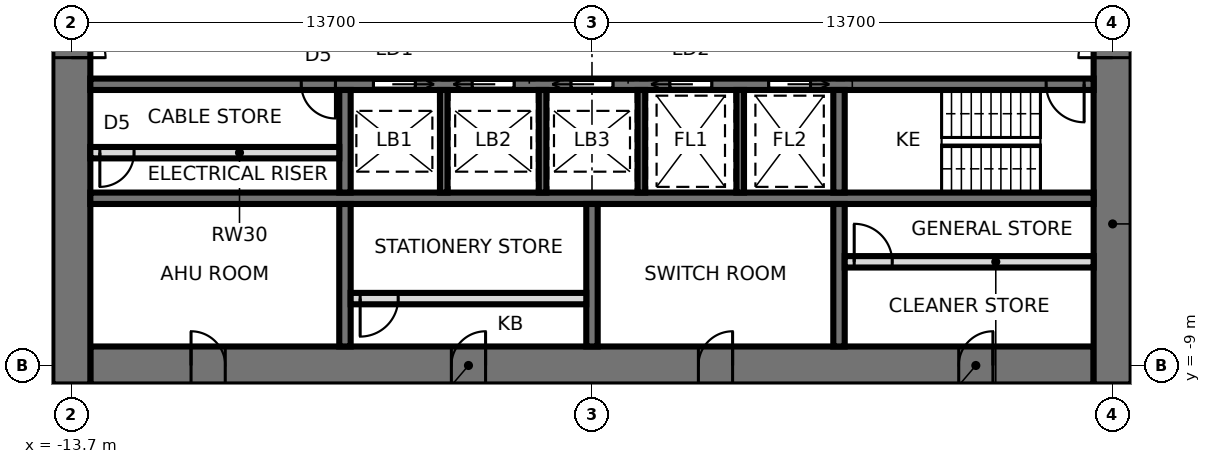
"""IFC4 building model, lengths in metres.
Left out: names, types, materials, properties, quantities, classifications, styles, units other than length and angle.
Written with IfcOpenShell. Run it as: python <this file> out.ifc"""

import sys

from ifc_helpers import new_model, si_unit, direction, frame, frame_2d, origin, place, context, subcontext, project, spatial, rectangle, extrude, element, fill, save


model = new_model("IFC4")
c1 = context("Model", 3, precision=1e-05, world=origin(), true_north=direction((0.0, 1.0)))
c2 = subcontext(c1, "Body", "Model", "MODEL_VIEW")
j1 = project(units=[si_unit("LENGTHUNIT", "METRE"), si_unit("PLANEANGLEUNIT", "RADIAN")], contexts=[c1])
p1 = place(None, origin())
s1 = spatial("IfcSite", under=j1, at=p1, CompositionType="ELEMENT")
p2 = place(p1, origin())
s2 = spatial("IfcBuilding", under=s1, at=p2, CompositionType="ELEMENT")
p3 = place(p2, frame((0.0, 0.0, 108.0)))
s3 = spatial("IfcBuildingStorey", under=s2, at=p3, CompositionType="ELEMENT", Elevation=108.0)
p4 = place(p3, frame((-13.2, -9.0, 0.0), z_axis=(0.0, 0.0, 1.0), x_axis=(1.0, 0.0, 0.0)))
e1 = element("IfcWall", 1, at=p4, inside=s3, PredefinedType="SHEAR", context=c2, shape_type="SweptSolid", body=[
    extrude(rectangle(XDim=26.4, YDim=1.0, at=frame_2d((13.2, 0.0))), origin(), (0.0, 0.0, 1.0), 3.9),
])
p5 = place(p4, frame((2.65, 0.0, 0.0)))
e2 = element("IfcOpeningElement", 2, at=p5, cuts=e1, PredefinedType="OPENING", context=c2, shape_type="SweptSolid", body=[
    extrude(rectangle(XDim=0.9, YDim=2.1, at=frame_2d((0.45, 1.05))), frame((0.0, 0.51, 0.0), z_axis=(0.0, -1.0, 0.0), x_axis=(1.0, 0.0, 0.0)), (0.0, 0.0, 1.0), 1.02),
])
p6 = place(p4, frame((9.5, 0.0, 0.0)))
e3 = element("IfcOpeningElement", 3, at=p6, cuts=e1, PredefinedType="OPENING", context=c2, shape_type="SweptSolid", body=[
    extrude(rectangle(XDim=0.9, YDim=2.1, at=frame_2d((0.45, 1.05))), frame((0.0, 0.51, 0.0), z_axis=(0.0, -1.0, 0.0), x_axis=(1.0, 0.0, 0.0)), (0.0, 0.0, 1.0), 1.02),
])
p7 = place(p4, frame((16.0, 0.0, 0.0)))
e4 = element("IfcOpeningElement", 4, at=p7, cuts=e1, PredefinedType="OPENING", context=c2, shape_type="SweptSolid", body=[
    extrude(rectangle(XDim=0.9, YDim=2.1, at=frame_2d((0.45, 1.05))), frame((0.0, 0.51, 0.0), z_axis=(0.0, -1.0, 0.0), x_axis=(1.0, 0.0, 0.0)), (0.0, 0.0, 1.0), 1.02),
])
p8 = place(p4, frame((22.85, 0.0, 0.0)))
e5 = element("IfcOpeningElement", 5, at=p8, cuts=e1, PredefinedType="OPENING", context=c2, shape_type="SweptSolid", body=[
    extrude(rectangle(XDim=0.9, YDim=2.1, at=frame_2d((0.45, 1.05))), frame((0.0, 0.51, 0.0), z_axis=(0.0, -1.0, 0.0), x_axis=(1.0, 0.0, 0.0)), (0.0, 0.0, 1.0), 1.02),
])
p9 = place(p3, frame((13.7, -9.5, 0.0), z_axis=(0.0, 0.0, 1.0), x_axis=(0.0, 1.0, 0.0)))
e6 = element("IfcWall", 6, at=p9, inside=s3, PredefinedType="SHEAR", context=c2, shape_type="SweptSolid", body=[
    extrude(rectangle(XDim=19.0, YDim=1.0, at=frame_2d((9.5, 0.0))), origin(), (0.0, 0.0, 1.0), 3.9),
])
p10 = place(p9, frame((8.6, 0.0, 0.0)))
e7 = element("IfcOpeningElement", 7, at=p10, cuts=e6, PredefinedType="OPENING", context=c2, shape_type="SweptSolid", body=[
    extrude(rectangle(XDim=1.8, YDim=2.4, at=frame_2d((0.9, 1.2))), frame((0.0, 0.51, 0.0), z_axis=(0.0, -1.0, 0.0), x_axis=(1.0, 0.0, 0.0)), (0.0, 0.0, 1.0), 1.02),
])
p11 = place(p3, frame((-13.7, 9.5, 0.0), z_axis=(0.0, 0.0, 1.0), x_axis=(0.0, -1.0, 0.0)))
e8 = element("IfcWall", 8, at=p11, inside=s3, PredefinedType="SHEAR", context=c2, shape_type="SweptSolid", body=[
    extrude(rectangle(XDim=19.0, YDim=1.0, at=frame_2d((9.5, 0.0))), origin(), (0.0, 0.0, 1.0), 3.9),
])
p12 = place(p11, frame((8.6, 0.0, 0.0)))
e9 = element("IfcOpeningElement", 9, at=p12, cuts=e8, PredefinedType="OPENING", context=c2, shape_type="SweptSolid", body=[
    extrude(rectangle(XDim=1.8, YDim=2.4, at=frame_2d((0.9, 1.2))), frame((0.0, 0.51, 0.0), z_axis=(0.0, -1.0, 0.0), x_axis=(1.0, 0.0, 0.0)), (0.0, 0.0, 1.0), 1.02),
])
p13 = place(p3, frame((-13.2, -1.6, 0.0), z_axis=(0.0, 0.0, 1.0), x_axis=(1.0, 0.0, 0.0)))
e10 = element("IfcWall", 10, at=p13, inside=s3, PredefinedType="SHEAR", context=c2, shape_type="SweptSolid", body=[
    extrude(rectangle(XDim=26.4, YDim=0.3, at=frame_2d((13.2, 0.0))), origin(), (0.0, 0.0, 1.0), 3.9),
])
p14 = place(p13, frame((25.15, 0.0, 0.0)))
e11 = element("IfcOpeningElement", 11, at=p14, cuts=e10, PredefinedType="OPENING", context=c2, shape_type="SweptSolid", body=[
    extrude(rectangle(XDim=1.0, YDim=2.1, at=frame_2d((0.5, 1.05))), frame((0.0, 0.16, 0.0), z_axis=(0.0, -1.0, 0.0), x_axis=(1.0, 0.0, 0.0)), (0.0, 0.0, 1.0), 0.32),
])
p15 = place(p13, frame((7.45, 0.0, 0.0)))
e12 = element("IfcOpeningElement", 12, at=p15, cuts=e10, PredefinedType="OPENING", context=c2, shape_type="SweptSolid", body=[
    extrude(rectangle(XDim=1.1, YDim=2.3, at=frame_2d((0.55, 1.15))), frame((0.0, 0.16, 0.0), z_axis=(0.0, -1.0, 0.0), x_axis=(1.0, 0.0, 0.0)), (0.0, 0.0, 1.0), 0.32),
])
p16 = place(p13, frame((10.05, 0.0, 0.0)))
e13 = element("IfcOpeningElement", 13, at=p16, cuts=e10, PredefinedType="OPENING", context=c2, shape_type="SweptSolid", body=[
    extrude(rectangle(XDim=1.1, YDim=2.3, at=frame_2d((0.55, 1.15))), frame((0.0, 0.16, 0.0), z_axis=(0.0, -1.0, 0.0), x_axis=(1.0, 0.0, 0.0)), (0.0, 0.0, 1.0), 0.32),
])
p17 = place(p13, frame((12.65, 0.0, 0.0)))
e14 = element("IfcOpeningElement", 14, at=p17, cuts=e10, PredefinedType="OPENING", context=c2, shape_type="SweptSolid", body=[
    extrude(rectangle(XDim=1.1, YDim=2.3, at=frame_2d((0.55, 1.15))), frame((0.0, 0.16, 0.0), z_axis=(0.0, -1.0, 0.0), x_axis=(1.0, 0.0, 0.0)), (0.0, 0.0, 1.0), 0.32),
])
p18 = place(p13, frame((15.25, 0.0, 0.0)))
e15 = element("IfcOpeningElement", 15, at=p18, cuts=e10, PredefinedType="OPENING", context=c2, shape_type="SweptSolid", body=[
    extrude(rectangle(XDim=1.1, YDim=2.3, at=frame_2d((0.55, 1.15))), frame((0.0, 0.16, 0.0), z_axis=(0.0, -1.0, 0.0), x_axis=(1.0, 0.0, 0.0)), (0.0, 0.0, 1.0), 0.32),
])
p19 = place(p13, frame((17.85, 0.0, 0.0)))
e16 = element("IfcOpeningElement", 16, at=p19, cuts=e10, PredefinedType="OPENING", context=c2, shape_type="SweptSolid", body=[
    extrude(rectangle(XDim=1.1, YDim=2.3, at=frame_2d((0.55, 1.15))), frame((0.0, 0.16, 0.0), z_axis=(0.0, -1.0, 0.0), x_axis=(1.0, 0.0, 0.0)), (0.0, 0.0, 1.0), 0.32),
])
p20 = place(p13, frame((5.55, 0.0, 0.0)))
e17 = element("IfcOpeningElement", 17, at=p20, cuts=e10, PredefinedType="OPENING", context=c2, shape_type="SweptSolid", body=[
    extrude(rectangle(XDim=0.9, YDim=2.1, at=frame_2d((0.45, 1.05))), frame((0.0, 0.16, 0.0), z_axis=(0.0, -1.0, 0.0), x_axis=(1.0, 0.0, 0.0)), (0.0, 0.0, 1.0), 0.32),
])
p21 = place(p3, frame((-13.2, -4.6, 0.0), z_axis=(0.0, 0.0, 1.0), x_axis=(1.0, 0.0, 0.0)))
e18 = element("IfcWall", 18, at=p21, inside=s3, PredefinedType="SHEAR", context=c2, shape_type="SweptSolid", body=[
    extrude(rectangle(XDim=26.4, YDim=0.3, at=frame_2d((13.2, 0.0))), origin(), (0.0, 0.0, 1.0), 3.9),
])
p22 = place(p3, frame((-6.5, -1.75, 0.0), z_axis=(0.0, 0.0, 1.0), x_axis=(0.0, -1.0, 0.0)))
e19 = element("IfcWall", 19, at=p22, inside=s3, PredefinedType="SHEAR", context=c2, shape_type="SweptSolid", body=[
    extrude(rectangle(XDim=2.7, YDim=0.3, at=frame_2d((1.35, 0.0))), origin(), (0.0, 0.0, 1.0), 3.9),
])
p23 = place(p3, frame((-6.5, -4.75, 0.0), z_axis=(0.0, 0.0, 1.0), x_axis=(0.0, -1.0, 0.0)))
e20 = element("IfcWall", 20, at=p23, inside=s3, PredefinedType="SHEAR", context=c2, shape_type="SweptSolid", body=[
    extrude(rectangle(XDim=3.75, YDim=0.3, at=frame_2d((1.875, 0.0))), origin(), (0.0, 0.0, 1.0), 3.9),
])
p24 = place(p3, frame((6.5, -1.75, 0.0), z_axis=(0.0, 0.0, 1.0), x_axis=(0.0, -1.0, 0.0)))
e21 = element("IfcWall", 21, at=p24, inside=s3, PredefinedType="SHEAR", context=c2, shape_type="SweptSolid", body=[
    extrude(rectangle(XDim=2.7, YDim=0.3, at=frame_2d((1.35, 0.0))), origin(), (0.0, 0.0, 1.0), 3.9),
])
p25 = place(p3, frame((6.5, -4.75, 0.0), z_axis=(0.0, 0.0, 1.0), x_axis=(0.0, -1.0, 0.0)))
e22 = element("IfcWall", 22, at=p25, inside=s3, PredefinedType="SHEAR", context=c2, shape_type="SweptSolid", body=[
    extrude(rectangle(XDim=3.75, YDim=0.3, at=frame_2d((1.875, 0.0))), origin(), (0.0, 0.0, 1.0), 3.9),
])
for number, where, z_axis, x_axis in (
    (23, (-3.9, -1.75, 0.0), (0.0, 0.0, 1.0), (0.0, -1.0, 0.0)),
    (24, (-1.3, -1.75, 0.0), (0.0, 0.0, 1.0), (0.0, -1.0, 0.0)),
    (25, (1.3, -1.75, 0.0), (0.0, 0.0, 1.0), (0.0, -1.0, 0.0)),
    (26, (3.9, -1.75, 0.0), (0.0, 0.0, 1.0), (0.0, -1.0, 0.0)),
):
    element("IfcWall", number, at=place(p3, frame(where, z_axis=z_axis, x_axis=x_axis)), inside=s3, PredefinedType="SHEAR", context=c2, shape_type="SweptSolid", body=[
        extrude(rectangle(XDim=2.7, YDim=0.2, at=frame_2d((1.35, 0.0))), origin(), (0.0, 0.0, 1.0), 3.9),
    ])
p26 = place(p3, frame((0.0, -4.75, 0.0), z_axis=(0.0, 0.0, 1.0), x_axis=(0.0, -1.0, 0.0)))
e27 = element("IfcWall", 27, at=p26, inside=s3, PredefinedType="SHEAR", context=c2, shape_type="SweptSolid", body=[
    extrude(rectangle(XDim=3.75, YDim=0.3, at=frame_2d((1.875, 0.0))), origin(), (0.0, 0.0, 1.0), 3.9),
])
p27 = place(p3, frame((-6.35, -7.24, 0.0), z_axis=(0.0, 0.0, 1.0), x_axis=(1.0, 0.0, 0.0)))
e28 = element("IfcWall", 28, at=p27, inside=s3, PredefinedType="PARTITIONING", context=c2, shape_type="SweptSolid", body=[
    extrude(rectangle(XDim=6.2, YDim=0.3, at=frame_2d((3.1, 0.0))), origin(), (0.0, 0.0, 1.0), 3.74),
])
p28 = place(p27, frame((0.25, 0.0, 0.0)))
e29 = element("IfcOpeningElement", 29, at=p28, cuts=e28, PredefinedType="OPENING", context=c2, shape_type="SweptSolid", body=[
    extrude(rectangle(XDim=1.0, YDim=2.4, at=frame_2d((0.5, 1.2))), frame((0.0, 0.16, 0.0), z_axis=(0.0, -1.0, 0.0), x_axis=(1.0, 0.0, 0.0)), (0.0, 0.0, 1.0), 0.32),
])
p29 = place(p3, frame((6.65, -6.272, 0.0), z_axis=(0.0, 0.0, 1.0), x_axis=(1.0, 0.0, 0.0)))
e30 = element("IfcWall", 30, at=p29, inside=s3, PredefinedType="PARTITIONING", context=c2, shape_type="SweptSolid", body=[
    extrude(rectangle(XDim=6.55, YDim=0.3, at=frame_2d((3.275, 0.0))), origin(), (0.0, 0.0, 1.0), 3.74),
])
p30 = place(p29, frame((0.25, 0.0, 0.0)))
e31 = element("IfcOpeningElement", 31, at=p30, cuts=e30, PredefinedType="OPENING", context=c2, shape_type="SweptSolid", body=[
    extrude(rectangle(XDim=1.0, YDim=2.4, at=frame_2d((0.5, 1.2))), frame((0.0, 0.16, 0.0), z_axis=(0.0, -1.0, 0.0), x_axis=(1.0, 0.0, 0.0)), (0.0, 0.0, 1.0), 0.32),
])
p31 = place(p3, frame((-13.2, -3.4, 0.0), z_axis=(0.0, 0.0, 1.0), x_axis=(1.0, 0.0, 0.0)))
e32 = element("IfcWall", 32, at=p31, inside=s3, PredefinedType="SOLIDWALL", context=c2, shape_type="SweptSolid", body=[
    extrude(rectangle(XDim=6.55, YDim=0.3, at=frame_2d((3.275, 0.0))), origin(), (0.0, 0.0, 1.0), 3.74),
])
p32 = place(p31, frame((0.25, 0.0, 0.0)))
e33 = element("IfcOpeningElement", 33, at=p32, cuts=e32, PredefinedType="OPENING", context=c2, shape_type="SweptSolid", body=[
    extrude(rectangle(XDim=0.9, YDim=2.1, at=frame_2d((0.45, 1.05))), frame((0.0, 0.16, 0.0), z_axis=(0.0, -1.0, 0.0), x_axis=(1.0, 0.0, 0.0)), (0.0, 0.0, 1.0), 0.32),
])
p33 = place(p12, origin())
e34 = element("IfcDoor", 34, at=p33, inside=s3, OperationType="DOUBLE_DOOR_SINGLE_SWING", PredefinedType="DOOR", context=c2, shape_type="SweptSolid", body=[
    extrude(rectangle(XDim=1.72, YDim=2.36, at=frame_2d((0.9, 1.18))), frame((0.0, 0.025, 0.0), z_axis=(0.0, -1.0, 0.0), x_axis=(1.0, 0.0, 0.0)), (0.0, 0.0, 1.0), 0.05),
    extrude(rectangle(XDim=0.04, YDim=2.4, at=frame_2d((0.02, 1.2))), frame((0.0, 0.25, 0.0), z_axis=(0.0, -1.0, 0.0), x_axis=(1.0, 0.0, 0.0)), (0.0, 0.0, 1.0), 0.5),
    extrude(rectangle(XDim=0.04, YDim=2.4, at=frame_2d((1.78, 1.2))), frame((0.0, 0.25, 0.0), z_axis=(0.0, -1.0, 0.0), x_axis=(1.0, 0.0, 0.0)), (0.0, 0.0, 1.0), 0.5),
    extrude(rectangle(XDim=1.72, YDim=0.04, at=frame_2d((0.9, 2.38))), frame((0.0, 0.25, 0.0), z_axis=(0.0, -1.0, 0.0), x_axis=(1.0, 0.0, 0.0)), (0.0, 0.0, 1.0), 0.5),
])
fill(e9, e34)
p34 = place(p10, origin())
e35 = element("IfcDoor", 35, at=p34, inside=s3, OperationType="DOUBLE_DOOR_SINGLE_SWING", PredefinedType="DOOR", context=c2, shape_type="SweptSolid", body=[
    extrude(rectangle(XDim=1.72, YDim=2.36, at=frame_2d((0.9, 1.18))), frame((0.0, 0.025, 0.0), z_axis=(0.0, -1.0, 0.0), x_axis=(1.0, 0.0, 0.0)), (0.0, 0.0, 1.0), 0.05),
    extrude(rectangle(XDim=0.04, YDim=2.4, at=frame_2d((0.02, 1.2))), frame((0.0, 0.25, 0.0), z_axis=(0.0, -1.0, 0.0), x_axis=(1.0, 0.0, 0.0)), (0.0, 0.0, 1.0), 0.5),
    extrude(rectangle(XDim=0.04, YDim=2.4, at=frame_2d((1.78, 1.2))), frame((0.0, 0.25, 0.0), z_axis=(0.0, -1.0, 0.0), x_axis=(1.0, 0.0, 0.0)), (0.0, 0.0, 1.0), 0.5),
    extrude(rectangle(XDim=1.72, YDim=0.04, at=frame_2d((0.9, 2.38))), frame((0.0, 0.25, 0.0), z_axis=(0.0, -1.0, 0.0), x_axis=(1.0, 0.0, 0.0)), (0.0, 0.0, 1.0), 0.5),
])
fill(e7, e35)
p35 = place(p14, frame((1.0, 0.0, 0.0), z_axis=(0.0, 0.0, 1.0), x_axis=(-1.0, 0.0, 0.0)))
e36 = element("IfcDoor", 36, at=p35, inside=s3, OperationType="SINGLE_SWING_LEFT", PredefinedType="DOOR", context=c2, shape_type="SweptSolid", body=[
    extrude(rectangle(XDim=1.0, YDim=2.1, at=frame_2d((0.5, 1.05))), frame((0.0, 0.025, 0.0), z_axis=(0.0, -1.0, 0.0), x_axis=(1.0, 0.0, 0.0)), (0.0, 0.0, 1.0), 0.05),
])
fill(e11, e36)
p36 = place(p15, frame((1.1, 0.0, 0.0), z_axis=(0.0, 0.0, 1.0), x_axis=(-1.0, 0.0, 0.0)))
e37 = element("IfcDoor", 37, at=p36, inside=s3, OperationType="SLIDING_TO_LEFT", PredefinedType="DOOR", context=c2, shape_type="SweptSolid", body=[
    extrude(rectangle(XDim=1.1, YDim=2.3, at=frame_2d((0.55, 1.15))), frame((0.0, 0.025, 0.0), z_axis=(0.0, -1.0, 0.0), x_axis=(1.0, 0.0, 0.0)), (0.0, 0.0, 1.0), 0.05),
])
fill(e12, e37)
p37 = place(p16, frame((1.1, 0.0, 0.0), z_axis=(0.0, 0.0, 1.0), x_axis=(-1.0, 0.0, 0.0)))
e38 = element("IfcDoor", 38, at=p37, inside=s3, OperationType="SLIDING_TO_RIGHT", PredefinedType="DOOR", context=c2, shape_type="SweptSolid", body=[
    extrude(rectangle(XDim=1.1, YDim=2.3, at=frame_2d((0.55, 1.15))), frame((0.0, 0.025, 0.0), z_axis=(0.0, -1.0, 0.0), x_axis=(1.0, 0.0, 0.0)), (0.0, 0.0, 1.0), 0.05),
])
fill(e13, e38)
p38 = place(p17, frame((1.1, 0.0, 0.0), z_axis=(0.0, 0.0, 1.0), x_axis=(-1.0, 0.0, 0.0)))
e39 = element("IfcDoor", 39, at=p38, inside=s3, OperationType="SLIDING_TO_RIGHT", PredefinedType="DOOR", context=c2, shape_type="SweptSolid", body=[
    extrude(rectangle(XDim=1.1, YDim=2.3, at=frame_2d((0.55, 1.15))), frame((0.0, 0.025, 0.0), z_axis=(0.0, -1.0, 0.0), x_axis=(1.0, 0.0, 0.0)), (0.0, 0.0, 1.0), 0.05),
])
fill(e14, e39)
p39 = place(p18, frame((1.1, 0.0, 0.0), z_axis=(0.0, 0.0, 1.0), x_axis=(-1.0, 0.0, 0.0)))
e40 = element("IfcDoor", 40, at=p39, inside=s3, OperationType="SLIDING_TO_RIGHT", PredefinedType="DOOR", context=c2, shape_type="SweptSolid", body=[
    extrude(rectangle(XDim=1.1, YDim=2.3, at=frame_2d((0.55, 1.15))), frame((0.0, 0.025, 0.0), z_axis=(0.0, -1.0, 0.0), x_axis=(1.0, 0.0, 0.0)), (0.0, 0.0, 1.0), 0.05),
])
fill(e15, e40)
p40 = place(p19, frame((1.1, 0.0, 0.0), z_axis=(0.0, 0.0, 1.0), x_axis=(-1.0, 0.0, 0.0)))
e41 = element("IfcDoor", 41, at=p40, inside=s3, OperationType="SLIDING_TO_LEFT", PredefinedType="DOOR", context=c2, shape_type="SweptSolid", body=[
    extrude(rectangle(XDim=1.1, YDim=2.3, at=frame_2d((0.55, 1.15))), frame((0.0, 0.025, 0.0), z_axis=(0.0, -1.0, 0.0), x_axis=(1.0, 0.0, 0.0)), (0.0, 0.0, 1.0), 0.05),
])
fill(e16, e41)
p41 = place(p20, frame((0.9, 0.0, 0.0), z_axis=(0.0, 0.0, 1.0), x_axis=(-1.0, 0.0, 0.0)))
e42 = element("IfcDoor", 42, at=p41, inside=s3, OperationType="SINGLE_SWING_LEFT", PredefinedType="DOOR", context=c2, shape_type="SweptSolid", body=[
    extrude(rectangle(XDim=0.9, YDim=2.1, at=frame_2d((0.45, 1.05))), frame((0.0, 0.025, 0.0), z_axis=(0.0, -1.0, 0.0), x_axis=(1.0, 0.0, 0.0)), (0.0, 0.0, 1.0), 0.05),
])
fill(e17, e42)
p42 = place(p5, origin())
e43 = element("IfcDoor", 43, at=p42, inside=s3, OperationType="SINGLE_SWING_LEFT", PredefinedType="DOOR", context=c2, shape_type="SweptSolid", body=[
    extrude(rectangle(XDim=0.82, YDim=2.06, at=frame_2d((0.45, 1.03))), frame((0.0, 0.025, 0.0), z_axis=(0.0, -1.0, 0.0), x_axis=(1.0, 0.0, 0.0)), (0.0, 0.0, 1.0), 0.05),
    extrude(rectangle(XDim=0.04, YDim=2.1, at=frame_2d((0.02, 1.05))), frame((0.0, 0.25, 0.0), z_axis=(0.0, -1.0, 0.0), x_axis=(1.0, 0.0, 0.0)), (0.0, 0.0, 1.0), 0.5),
    extrude(rectangle(XDim=0.04, YDim=2.1, at=frame_2d((0.88, 1.05))), frame((0.0, 0.25, 0.0), z_axis=(0.0, -1.0, 0.0), x_axis=(1.0, 0.0, 0.0)), (0.0, 0.0, 1.0), 0.5),
    extrude(rectangle(XDim=0.82, YDim=0.04, at=frame_2d((0.45, 2.08))), frame((0.0, 0.25, 0.0), z_axis=(0.0, -1.0, 0.0), x_axis=(1.0, 0.0, 0.0)), (0.0, 0.0, 1.0), 0.5),
])
fill(e2, e43)
p43 = place(p6, origin())
e44 = element("IfcDoor", 44, at=p43, inside=s3, OperationType="SINGLE_SWING_RIGHT", PredefinedType="DOOR", context=c2, shape_type="SweptSolid", body=[
    extrude(rectangle(XDim=0.82, YDim=2.06, at=frame_2d((0.45, 1.03))), frame((0.0, 0.025, 0.0), z_axis=(0.0, -1.0, 0.0), x_axis=(1.0, 0.0, 0.0)), (0.0, 0.0, 1.0), 0.05),
    extrude(rectangle(XDim=0.04, YDim=2.1, at=frame_2d((0.02, 1.05))), frame((0.0, 0.25, 0.0), z_axis=(0.0, -1.0, 0.0), x_axis=(1.0, 0.0, 0.0)), (0.0, 0.0, 1.0), 0.5),
    extrude(rectangle(XDim=0.04, YDim=2.1, at=frame_2d((0.88, 1.05))), frame((0.0, 0.25, 0.0), z_axis=(0.0, -1.0, 0.0), x_axis=(1.0, 0.0, 0.0)), (0.0, 0.0, 1.0), 0.5),
    extrude(rectangle(XDim=0.82, YDim=0.04, at=frame_2d((0.45, 2.08))), frame((0.0, 0.25, 0.0), z_axis=(0.0, -1.0, 0.0), x_axis=(1.0, 0.0, 0.0)), (0.0, 0.0, 1.0), 0.5),
])
fill(e3, e44)
p44 = place(p7, origin())
e45 = element("IfcDoor", 45, at=p44, inside=s3, OperationType="SINGLE_SWING_RIGHT", PredefinedType="DOOR", context=c2, shape_type="SweptSolid", body=[
    extrude(rectangle(XDim=0.82, YDim=2.06, at=frame_2d((0.45, 1.03))), frame((0.0, 0.025, 0.0), z_axis=(0.0, -1.0, 0.0), x_axis=(1.0, 0.0, 0.0)), (0.0, 0.0, 1.0), 0.05),
    extrude(rectangle(XDim=0.04, YDim=2.1, at=frame_2d((0.02, 1.05))), frame((0.0, 0.25, 0.0), z_axis=(0.0, -1.0, 0.0), x_axis=(1.0, 0.0, 0.0)), (0.0, 0.0, 1.0), 0.5),
    extrude(rectangle(XDim=0.04, YDim=2.1, at=frame_2d((0.88, 1.05))), frame((0.0, 0.25, 0.0), z_axis=(0.0, -1.0, 0.0), x_axis=(1.0, 0.0, 0.0)), (0.0, 0.0, 1.0), 0.5),
    extrude(rectangle(XDim=0.82, YDim=0.04, at=frame_2d((0.45, 2.08))), frame((0.0, 0.25, 0.0), z_axis=(0.0, -1.0, 0.0), x_axis=(1.0, 0.0, 0.0)), (0.0, 0.0, 1.0), 0.5),
])
fill(e4, e45)
p45 = place(p8, origin())
e46 = element("IfcDoor", 46, at=p45, inside=s3, OperationType="SINGLE_SWING_RIGHT", PredefinedType="DOOR", context=c2, shape_type="SweptSolid", body=[
    extrude(rectangle(XDim=0.82, YDim=2.06, at=frame_2d((0.45, 1.03))), frame((0.0, 0.025, 0.0), z_axis=(0.0, -1.0, 0.0), x_axis=(1.0, 0.0, 0.0)), (0.0, 0.0, 1.0), 0.05),
    extrude(rectangle(XDim=0.04, YDim=2.1, at=frame_2d((0.02, 1.05))), frame((0.0, 0.25, 0.0), z_axis=(0.0, -1.0, 0.0), x_axis=(1.0, 0.0, 0.0)), (0.0, 0.0, 1.0), 0.5),
    extrude(rectangle(XDim=0.04, YDim=2.1, at=frame_2d((0.88, 1.05))), frame((0.0, 0.25, 0.0), z_axis=(0.0, -1.0, 0.0), x_axis=(1.0, 0.0, 0.0)), (0.0, 0.0, 1.0), 0.5),
    extrude(rectangle(XDim=0.82, YDim=0.04, at=frame_2d((0.45, 2.08))), frame((0.0, 0.25, 0.0), z_axis=(0.0, -1.0, 0.0), x_axis=(1.0, 0.0, 0.0)), (0.0, 0.0, 1.0), 0.5),
])
fill(e5, e46)
p46 = place(p28, frame((1.0, 0.0, 0.0), z_axis=(0.0, 0.0, 1.0), x_axis=(-1.0, 0.0, 0.0)))
e47 = element("IfcDoor", 47, at=p46, inside=s3, OperationType="SINGLE_SWING_RIGHT", PredefinedType="DOOR", context=c2, shape_type="SweptSolid", body=[
    extrude(rectangle(XDim=1.0, YDim=2.4, at=frame_2d((0.5, 1.2))), frame((0.0, 0.025, 0.0), z_axis=(0.0, -1.0, 0.0), x_axis=(1.0, 0.0, 0.0)), (0.0, 0.0, 1.0), 0.05),
])
fill(e29, e47)
p47 = place(p30, origin())
e48 = element("IfcDoor", 48, at=p47, inside=s3, OperationType="SINGLE_SWING_LEFT", PredefinedType="DOOR", context=c2, shape_type="SweptSolid", body=[
    extrude(rectangle(XDim=1.0, YDim=2.4, at=frame_2d((0.5, 1.2))), frame((0.0, 0.025, 0.0), z_axis=(0.0, -1.0, 0.0), x_axis=(1.0, 0.0, 0.0)), (0.0, 0.0, 1.0), 0.05),
])
fill(e31, e48)
p48 = place(p32, frame((0.9, 0.0, 0.0), z_axis=(0.0, 0.0, 1.0), x_axis=(-1.0, 0.0, 0.0)))
e49 = element("IfcDoor", 49, at=p48, inside=s3, OperationType="SINGLE_SWING_RIGHT", PredefinedType="DOOR", context=c2, shape_type="SweptSolid", body=[
    extrude(rectangle(XDim=0.9, YDim=2.1, at=frame_2d((0.45, 1.05))), frame((0.0, 0.025, 0.0), z_axis=(0.0, -1.0, 0.0), x_axis=(1.0, 0.0, 0.0)), (0.0, 0.0, 1.0), 0.05),
])
fill(e33, e49)
save(model, sys.argv[1])
